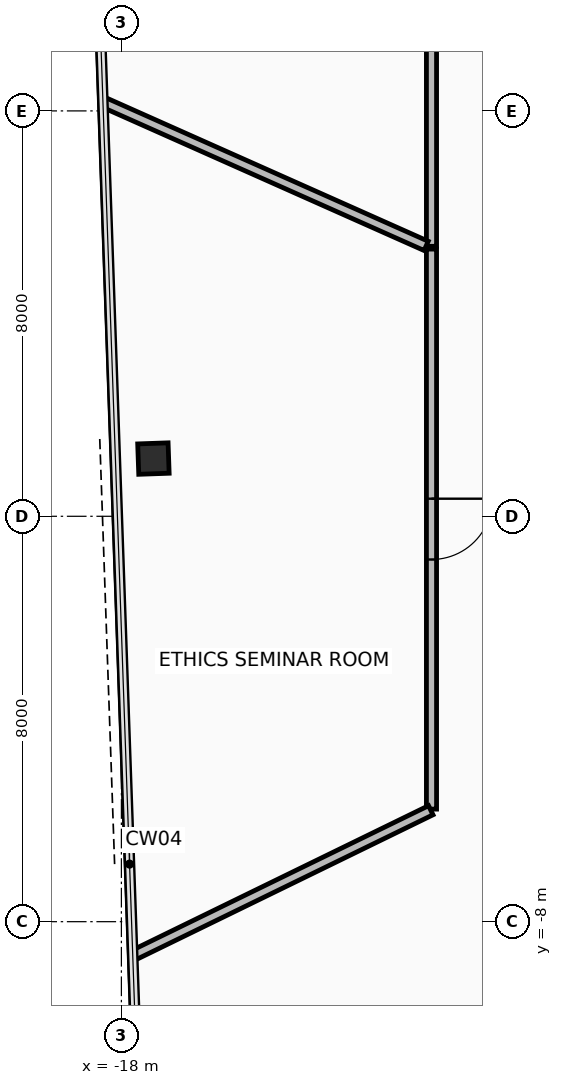
"""IFC4 building model, lengths in metres.
Left out: names, types, materials, properties, quantities, classifications, styles, units other than length and angle.
Written with IfcOpenShell. Run it as: python <this file> out.ifc"""

import sys

from ifc_helpers import new_model, si_unit, direction, frame, frame_2d, origin, origin_2d, place, context, subcontext, project, spatial, rectangle, hollow_rectangle, extrude, element, fill, save


model = new_model("IFC4")
c1 = context("Model", 3, precision=1e-05, world=origin(), true_north=direction((0.0, 1.0)))
c2 = subcontext(c1, "Body", "Model", "MODEL_VIEW")
j1 = project(units=[si_unit("LENGTHUNIT", "METRE"), si_unit("PLANEANGLEUNIT", "RADIAN")], contexts=[c1])
p1 = place(None, origin())
s1 = spatial("IfcSite", under=j1, at=p1, CompositionType="ELEMENT")
p2 = place(p1, origin())
s2 = spatial("IfcBuilding", under=s1, at=p2, CompositionType="ELEMENT")
p3 = place(p2, frame((0.0, 0.0, 156.8)))
s3 = spatial("IfcBuildingStorey", under=s2, at=p3, CompositionType="ELEMENT", Elevation=156.8)
p4 = place(p3, frame((-17.368, 1.139, 0.0), z_axis=(0.0, 0.0, 1.0), x_axis=(-0.034899496703, 0.999390827019, 0.0)))
e1 = element("IfcColumn", 1, at=p4, inside=s3, PredefinedType="COLUMN", context=c2, shape_type="SweptSolid", body=[
    extrude(hollow_rectangle(XDim=0.6, YDim=0.6, WallThickness=0.036, at=origin_2d()), origin(), (0.0, 0.0, 1.0), 3.6),
])
p5 = place(p3, frame((-11.88, 10.579, 0.0), z_axis=(0.0, 0.0, 1.0), x_axis=(0.0, -1.0, 0.0)))
e2 = element("IfcWall", 2, at=p5, inside=s3, PredefinedType="PARTITIONING", context=c2, shape_type="SweptSolid", body=[
    extrude(rectangle(XDim=5.251, YDim=0.2, at=frame_2d((2.626, 0.0))), origin(), (0.0, 0.0, 1.0), 2.855),
])
p6 = place(p3, frame((-11.985, 5.336, 0.0), z_axis=(0.0, 0.0, 1.0), x_axis=(-0.913541116326, 0.406746393693, 0.0)))
e3 = element("IfcWall", 3, at=p6, inside=s3, PredefinedType="PARTITIONING", context=c2, shape_type="SweptSolid", body=[
    extrude(rectangle(XDim=6.967, YDim=0.2, at=frame_2d((3.483, 0.0))), origin(), (0.0, 0.0, 1.0), 2.705),
])
p7 = place(p3, frame((-11.88, 5.273, 0.0), z_axis=(0.0, 0.0, 1.0), x_axis=(0.0, -1.0, 0.0)))
e4 = element("IfcWall", 4, at=p7, inside=s3, PredefinedType="PARTITIONING", context=c2, shape_type="SweptSolid", body=[
    extrude(rectangle(XDim=11.052, YDim=0.2, at=frame_2d((5.526, 0.0))), origin(), (0.0, 0.0, 1.0), 2.855),
])
p8 = place(p7, frame((4.926, 0.0, 0.0)))
e5 = element("IfcOpeningElement", 5, at=p8, cuts=e4, PredefinedType="OPENING", context=c2, shape_type="SweptSolid", body=[
    extrude(rectangle(XDim=1.2, YDim=2.15, at=frame_2d((0.6, 1.075))), frame((0.0, 0.11, 0.0), z_axis=(0.0, -1.0, 0.0), x_axis=(1.0, 0.0, 0.0)), (0.0, 0.0, 1.0), 0.22),
])
p9 = place(p3, frame((-11.894, -5.801, 0.0), z_axis=(0.0, 0.0, 1.0), x_axis=(-0.89877884349, -0.438402315796, 0.0)))
e6 = element("IfcWall", 6, at=p9, inside=s3, PredefinedType="PARTITIONING", context=c2, shape_type="SweptSolid", body=[
    extrude(rectangle(XDim=6.544, YDim=0.2, at=frame_2d((3.272, 0.0))), origin(), (0.0, 0.0, 1.0), 2.705),
])
p10 = place(p8, origin())
e7 = element("IfcDoor", 7, at=p10, inside=s3, OperationType="SINGLE_SWING_LEFT", PredefinedType="DOOR", context=c2, shape_type="SweptSolid", body=[
    extrude(rectangle(XDim=1.2, YDim=2.15, at=frame_2d((0.6, 1.075))), frame((0.0, 0.025, 0.0), z_axis=(0.0, -1.0, 0.0), x_axis=(1.0, 0.0, 0.0)), (0.0, 0.0, 1.0), 0.05),
])
fill(e5, e7)
save(model, sys.argv[1])
